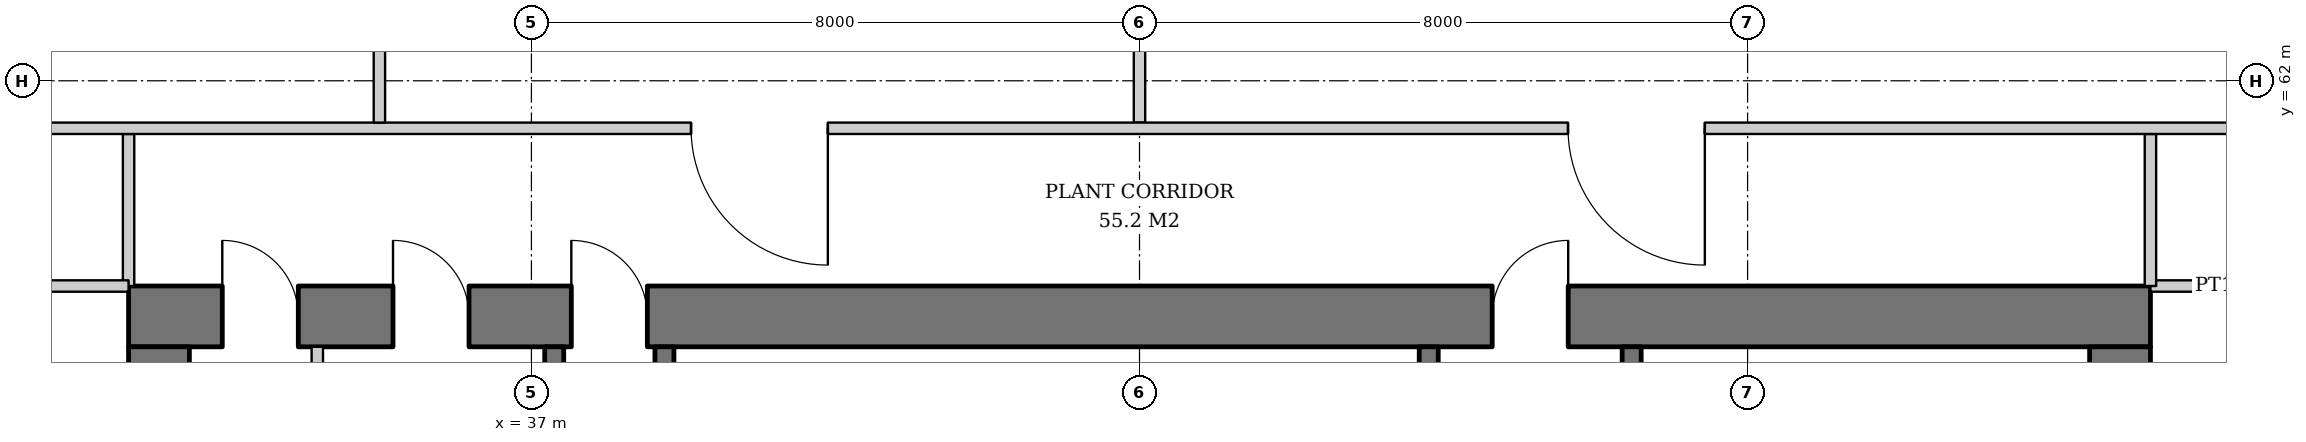
"""IFC4 building model, lengths in metres.
Left out: names, types, materials, properties, quantities, classifications, styles, units other than length and angle.
Written with IfcOpenShell. Run it as: python <this file> out.ifc"""

import sys

from ifc_helpers import new_model, si_unit, direction, frame, frame_2d, origin, place, context, subcontext, project, spatial, rectangle, extrude, element, fill, save


model = new_model("IFC4")
c1 = context("Model", 3, precision=1e-05, world=origin(), true_north=direction((0.0, 1.0)))
c2 = subcontext(c1, "Body", "Model", "MODEL_VIEW")
j1 = project(units=[si_unit("LENGTHUNIT", "METRE"), si_unit("PLANEANGLEUNIT", "RADIAN")], contexts=[c1])
p1 = place(None, origin())
s1 = spatial("IfcSite", under=j1, at=p1, CompositionType="ELEMENT")
p2 = place(p1, origin())
s2 = spatial("IfcBuilding", under=s1, at=p2, CompositionType="ELEMENT")
p3 = place(p2, frame((0.0, 0.0, 81.8)))
s3 = spatial("IfcBuildingStorey", under=s2, at=p3, CompositionType="ELEMENT", Elevation=81.8)
p4 = place(p3, frame((31.7, 58.9, 0.0), z_axis=(0.0, 0.0, 1.0), x_axis=(1.0, 0.0, 0.0)))
e1 = element("IfcWall", 1, at=p4, inside=s3, PredefinedType="SHEAR", context=c2, shape_type="SweptSolid", body=[
    extrude(rectangle(XDim=26.6, YDim=0.8, at=frame_2d((13.3, 0.0))), origin(), (0.0, 0.0, 1.0), 3.8),
])
p5 = place(p4, frame((17.94, 0.0, 0.0)))
e2 = element("IfcOpeningElement", 2, at=p5, cuts=e1, PredefinedType="OPENING", context=c2, shape_type="SweptSolid", body=[
    extrude(rectangle(XDim=1.0, YDim=2.1, at=frame_2d((0.5, 1.05))), frame((0.0, 0.41, 0.0), z_axis=(0.0, -1.0, 0.0), x_axis=(1.0, 0.0, 0.0)), (0.0, 0.0, 1.0), 0.82),
])
p6 = place(p4, frame((5.825, 0.0, 0.0)))
e3 = element("IfcOpeningElement", 3, at=p6, cuts=e1, PredefinedType="OPENING", context=c2, shape_type="SweptSolid", body=[
    extrude(rectangle(XDim=1.0, YDim=2.1, at=frame_2d((0.5, 1.05))), frame((0.0, 0.41, 0.0), z_axis=(0.0, -1.0, 0.0), x_axis=(1.0, 0.0, 0.0)), (0.0, 0.0, 1.0), 0.82),
])
p7 = place(p4, frame((1.233, 0.0, 0.0)))
e4 = element("IfcOpeningElement", 4, at=p7, cuts=e1, PredefinedType="OPENING", context=c2, shape_type="SweptSolid", body=[
    extrude(rectangle(XDim=1.0, YDim=2.1, at=frame_2d((0.5, 1.05))), frame((0.0, 0.41, 0.0), z_axis=(0.0, -1.0, 0.0), x_axis=(1.0, 0.0, 0.0)), (0.0, 0.0, 1.0), 0.82),
])
p8 = place(p4, frame((3.479, 0.0, 0.0)))
e5 = element("IfcOpeningElement", 5, at=p8, cuts=e1, PredefinedType="OPENING", context=c2, shape_type="SweptSolid", body=[
    extrude(rectangle(XDim=1.0, YDim=2.1, at=frame_2d((0.5, 1.05))), frame((0.0, 0.41, 0.0), z_axis=(0.0, -1.0, 0.0), x_axis=(1.0, 0.0, 0.0)), (0.0, 0.0, 1.0), 0.82),
])
p9 = place(p3, frame((32.1, 33.5, 0.0), z_axis=(0.0, 0.0, 1.0), x_axis=(0.0, 1.0, 0.0)))
e6 = element("IfcWall", 6, at=p9, inside=s3, PredefinedType="SHEAR", context=c2, shape_type="SweptSolid", body=[
    extrude(rectangle(XDim=25.0, YDim=0.8, at=frame_2d((12.5, 0.0))), origin(), (0.0, 0.0, 1.0), 3.8),
])
p10 = place(p9, frame((11.6, 0.0, 0.0)))
e7 = element("IfcOpeningElement", 7, at=p10, cuts=e6, PredefinedType="OPENING", context=c2, shape_type="SweptSolid", body=[
    extrude(rectangle(XDim=1.8, YDim=2.4, at=frame_2d((0.9, 1.2))), frame((0.0, 0.41, 0.0), z_axis=(0.0, -1.0, 0.0), x_axis=(1.0, 0.0, 0.0)), (0.0, 0.0, 1.0), 0.82),
])
p11 = place(p3, frame((57.9, 33.5, 0.0), z_axis=(0.0, 0.0, 1.0), x_axis=(0.0, 1.0, 0.0)))
e8 = element("IfcWall", 8, at=p11, inside=s3, PredefinedType="SHEAR", context=c2, shape_type="SweptSolid", body=[
    extrude(rectangle(XDim=25.0, YDim=0.8, at=frame_2d((12.5, 0.0))), origin(), (0.0, 0.0, 1.0), 3.8),
])
p12 = place(p11, frame((11.6, 0.0, 0.0)))
e9 = element("IfcOpeningElement", 9, at=p12, cuts=e8, PredefinedType="OPENING", context=c2, shape_type="SweptSolid", body=[
    extrude(rectangle(XDim=1.8, YDim=2.4, at=frame_2d((0.9, 1.2))), frame((0.0, 0.41, 0.0), z_axis=(0.0, -1.0, 0.0), x_axis=(1.0, 0.0, 0.0)), (0.0, 0.0, 1.0), 0.82),
])
p13 = place(p3, frame((48.805, 55.9, 0.0), z_axis=(0.0, 0.0, 1.0), x_axis=(0.0, 1.0, 0.0)))
e10 = element("IfcWall", 10, at=p13, inside=s3, PredefinedType="SOLIDWALL", context=c2, shape_type="SweptSolid", body=[
    extrude(rectangle(XDim=2.6, YDim=0.25, at=frame_2d((1.3, 0.0))), origin(), (0.0, 0.0, 1.0), 3.52),
])
p14 = place(p13, frame((0.8, 0.0, 0.0)))
e11 = element("IfcOpeningElement", 11, at=p14, cuts=e10, PredefinedType="OPENING", context=c2, shape_type="SweptSolid", body=[
    extrude(rectangle(XDim=1.0, YDim=2.1, at=frame_2d((0.5, 1.05))), frame((0.0, 0.135, 0.0), z_axis=(0.0, -1.0, 0.0), x_axis=(1.0, 0.0, 0.0)), (0.0, 0.0, 1.0), 0.27),
])
p15 = place(p3, frame((51.475, 55.9, 0.0), z_axis=(0.0, 0.0, 1.0), x_axis=(0.0, 1.0, 0.0)))
e12 = element("IfcWall", 12, at=p15, inside=s3, PredefinedType="SOLIDWALL", context=c2, shape_type="SweptSolid", body=[
    extrude(rectangle(XDim=2.6, YDim=0.25, at=frame_2d((1.3, 0.0))), origin(), (0.0, 0.0, 1.0), 3.52),
])
p16 = place(p15, frame((0.8, 0.0, 0.0)))
e13 = element("IfcOpeningElement", 13, at=p16, cuts=e12, PredefinedType="OPENING", context=c2, shape_type="SweptSolid", body=[
    extrude(rectangle(XDim=1.0, YDim=2.1, at=frame_2d((0.5, 1.05))), frame((0.0, 0.135, 0.0), z_axis=(0.0, -1.0, 0.0), x_axis=(1.0, 0.0, 0.0)), (0.0, 0.0, 1.0), 0.27),
])
p17 = place(p3, frame((37.3, 55.9, 0.0), z_axis=(0.0, 0.0, 1.0), x_axis=(0.0, 1.0, 0.0)))
e14 = element("IfcWall", 14, at=p17, inside=s3, PredefinedType="SOLIDWALL", context=c2, shape_type="SweptSolid", body=[
    extrude(rectangle(XDim=2.6, YDim=0.25, at=frame_2d((1.3, 0.0))), origin(), (0.0, 0.0, 1.0), 3.52),
])
p18 = place(p3, frame((38.75, 55.9, 0.0), z_axis=(0.0, 0.0, 1.0), x_axis=(0.0, 1.0, 0.0)))
e15 = element("IfcWall", 15, at=p18, inside=s3, PredefinedType="SOLIDWALL", context=c2, shape_type="SweptSolid", body=[
    extrude(rectangle(XDim=2.6, YDim=0.25, at=frame_2d((1.3, 0.0))), origin(), (0.0, 0.0, 1.0), 3.52),
])
p19 = place(p18, frame((0.8, 0.0, 0.0)))
e16 = element("IfcOpeningElement", 16, at=p19, cuts=e15, PredefinedType="OPENING", context=c2, shape_type="SweptSolid", body=[
    extrude(rectangle(XDim=1.0, YDim=2.1, at=frame_2d((0.5, 1.05))), frame((0.0, 0.135, 0.0), z_axis=(0.0, -1.0, 0.0), x_axis=(1.0, 0.0, 0.0)), (0.0, 0.0, 1.0), 0.27),
])
p20 = place(p3, frame((34.183, 53.25, 0.0), z_axis=(0.0, 0.0, 1.0), x_axis=(0.0, 1.0, 0.0)))
e17 = element("IfcWall", 17, at=p20, inside=s3, PredefinedType="SOLIDWALL", context=c2, shape_type="SweptSolid", body=[
    extrude(rectangle(XDim=5.25, YDim=0.15, at=frame_2d((2.625, 0.0))), origin(), (0.0, 0.0, 1.0), 3.52),
])
for number, where, z_axis, x_axis in (
    (18, (58.3, 59.3, 0.0), (0.0, 0.0, 1.0), (1.0, 0.0, 0.0)),
    (19, (31.7, 59.3, 0.0), (0.0, 0.0, 1.0), (0.0, 1.0, 0.0)),
):
    element("IfcWall", number, at=place(p3, frame(where, z_axis=z_axis, x_axis=x_axis)), inside=s3, PredefinedType="PARTITIONING", context=c2, shape_type="SweptSolid", body=[
        extrude(rectangle(XDim=2.0, YDim=0.15, at=frame_2d((1.0, 0.0))), origin(), (0.0, 0.0, 1.0), 3.52),
    ])
p21 = place(p3, frame((58.3, 59.3, 0.0), z_axis=(0.0, 0.0, 1.0), x_axis=(0.0, 1.0, 0.0)))
e20 = element("IfcWall", 20, at=p21, inside=s3, PredefinedType="PARTITIONING", context=c2, shape_type="SweptSolid", body=[
    extrude(rectangle(XDim=2.0, YDim=0.15, at=frame_2d((1.0, 0.0))), origin(), (0.0, 0.0, 1.0), 2.512),
])
p22 = place(p3, frame((45.0, 61.45, 0.0), z_axis=(0.0, 0.0, 1.0), x_axis=(0.0, 1.0, 0.0)))
e21 = element("IfcWall", 21, at=p22, inside=s3, PredefinedType="SOLIDWALL", context=c2, shape_type="SweptSolid", body=[
    extrude(rectangle(XDim=5.35, YDim=0.15, at=frame_2d((2.675, 0.0))), origin(), (0.0, 0.0, 1.0), 2.758),
])
p23 = place(p3, frame((60.45, 61.375, 0.0), z_axis=(0.0, 0.0, 1.0), x_axis=(-1.0, 0.0, 0.0)))
e22 = element("IfcWall", 22, at=p23, inside=s3, PredefinedType="SOLIDWALL", context=c2, shape_type="SweptSolid", body=[
    extrude(rectangle(XDim=30.75, YDim=0.15, at=frame_2d((15.375, 0.0))), origin(), (0.0, 0.0, 1.0), 2.512),
])
p24 = place(p23, frame((8.012, 0.0, 0.0)))
e23 = element("IfcOpeningElement", 23, at=p24, cuts=e22, PredefinedType="OPENING", context=c2, shape_type="SweptSolid", body=[
    extrude(rectangle(XDim=1.8, YDim=2.4, at=frame_2d((0.9, 1.2))), frame((0.0, 0.085, 0.0), z_axis=(0.0, -1.0, 0.0), x_axis=(1.0, 0.0, 0.0)), (0.0, 0.0, 1.0), 0.17),
])
p25 = place(p23, frame((19.55, 0.0, 0.0)))
e24 = element("IfcOpeningElement", 24, at=p25, cuts=e22, PredefinedType="OPENING", context=c2, shape_type="SweptSolid", body=[
    extrude(rectangle(XDim=1.8, YDim=2.4, at=frame_2d((0.9, 1.2))), frame((0.0, 0.085, 0.0), z_axis=(0.0, -1.0, 0.0), x_axis=(1.0, 0.0, 0.0)), (0.0, 0.0, 1.0), 0.17),
])
p26 = place(p3, frame((35.0, 61.45, 0.0), z_axis=(0.0, 0.0, 1.0), x_axis=(0.0, 1.0, 0.0)))
e25 = element("IfcWall", 25, at=p26, inside=s3, PredefinedType="SOLIDWALL", context=c2, shape_type="SweptSolid", body=[
    extrude(rectangle(XDim=5.35, YDim=0.15, at=frame_2d((2.675, 0.0))), origin(), (0.0, 0.0, 1.0), 3.52),
])
p27 = place(p3, frame((31.7, 59.3, 0.0), z_axis=(0.0, 0.0, 1.0), x_axis=(-1.0, 0.0, 0.0)))
e26 = element("IfcWall", 26, at=p27, inside=s3, PredefinedType="PARTITIONING", context=c2, shape_type="SweptSolid", body=[
    extrude(rectangle(XDim=2.0, YDim=0.15, at=frame_2d((1.0, 0.0))), origin(), (0.0, 0.0, 1.0), 2.512),
])
p28 = place(p5, origin())
e27 = element("IfcDoor", 27, at=p28, inside=s3, OperationType="SINGLE_SWING_RIGHT", PredefinedType="DOOR", context=c2, shape_type="SweptSolid", body=[
    extrude(rectangle(XDim=1.0, YDim=2.1, at=frame_2d((0.5, 1.05))), frame((0.0, 0.025, 0.0), z_axis=(0.0, -1.0, 0.0), x_axis=(1.0, 0.0, 0.0)), (0.0, 0.0, 1.0), 0.05),
])
fill(e2, e27)
p29 = place(p6, origin())
e28 = element("IfcDoor", 28, at=p29, inside=s3, OperationType="SINGLE_SWING_LEFT", PredefinedType="DOOR", context=c2, shape_type="SweptSolid", body=[
    extrude(rectangle(XDim=1.0, YDim=2.1, at=frame_2d((0.5, 1.05))), frame((0.0, 0.025, 0.0), z_axis=(0.0, -1.0, 0.0), x_axis=(1.0, 0.0, 0.0)), (0.0, 0.0, 1.0), 0.05),
])
fill(e3, e28)
p30 = place(p7, origin())
e29 = element("IfcDoor", 29, at=p30, inside=s3, OperationType="SINGLE_SWING_LEFT", PredefinedType="DOOR", context=c2, shape_type="SweptSolid", body=[
    extrude(rectangle(XDim=1.0, YDim=2.1, at=frame_2d((0.5, 1.05))), frame((0.0, -0.34, 0.0), z_axis=(0.0, -1.0, 0.0), x_axis=(1.0, 0.0, 0.0)), (0.0, 0.0, 1.0), 0.05),
])
fill(e4, e29)
p31 = place(p8, origin())
e30 = element("IfcDoor", 30, at=p31, inside=s3, OperationType="SINGLE_SWING_LEFT", PredefinedType="DOOR", context=c2, shape_type="SweptSolid", body=[
    extrude(rectangle(XDim=1.0, YDim=2.1, at=frame_2d((0.5, 1.05))), frame((0.0, -0.34, 0.0), z_axis=(0.0, -1.0, 0.0), x_axis=(1.0, 0.0, 0.0)), (0.0, 0.0, 1.0), 0.05),
])
fill(e5, e30)
p32 = place(p24, origin())
e31 = element("IfcDoor", 31, at=p32, inside=s3, OperationType="DOUBLE_DOOR_SINGLE_SWING", PredefinedType="DOOR", context=c2, shape_type="SweptSolid", body=[
    extrude(rectangle(XDim=1.8, YDim=2.4, at=frame_2d((0.9, 1.2))), frame((0.0, 0.025, 0.0), z_axis=(0.0, -1.0, 0.0), x_axis=(1.0, 0.0, 0.0)), (0.0, 0.0, 1.0), 0.05),
])
fill(e23, e31)
p33 = place(p25, origin())
e32 = element("IfcDoor", 32, at=p33, inside=s3, OperationType="DOUBLE_DOOR_SINGLE_SWING", PredefinedType="DOOR", context=c2, shape_type="SweptSolid", body=[
    extrude(rectangle(XDim=1.8, YDim=2.4, at=frame_2d((0.9, 1.2))), frame((0.0, 0.025, 0.0), z_axis=(0.0, -1.0, 0.0), x_axis=(1.0, 0.0, 0.0)), (0.0, 0.0, 1.0), 0.05),
])
fill(e24, e32)
save(model, sys.argv[1])
